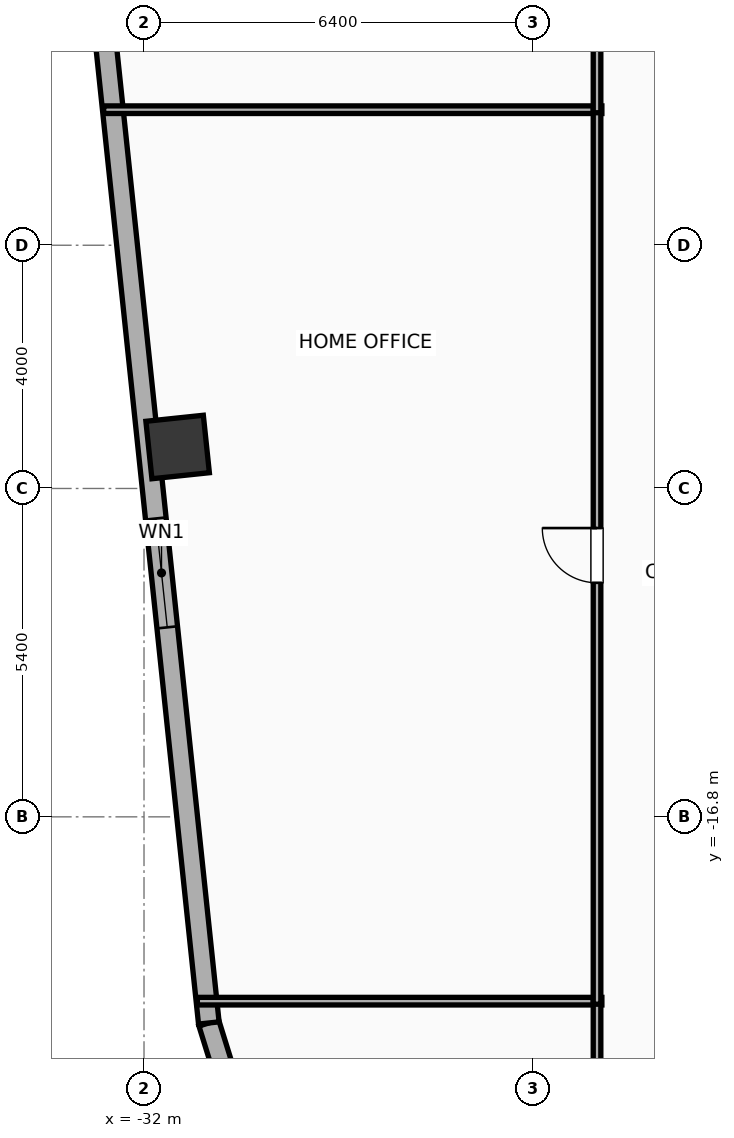
"""IFC4 building model, lengths in metres.
Left out: names, types, materials, properties, quantities, classifications, styles, units other than length and angle.
Written with IfcOpenShell. Run it as: python <this file> out.ifc"""

import sys

from ifc_helpers import new_model, si_unit, direction, frame, frame_2d, origin, origin_2d, place, context, subcontext, project, spatial, rectangle, hollow_rectangle, extrude, element, fill, save


model = new_model("IFC4")
c1 = context("Model", 3, precision=1e-05, world=origin(), true_north=direction((0.0, 1.0)))
c2 = subcontext(c1, "Body", "Model", "MODEL_VIEW")
j1 = project(units=[si_unit("LENGTHUNIT", "METRE"), si_unit("PLANEANGLEUNIT", "RADIAN")], contexts=[c1])
p1 = place(None, origin())
s1 = spatial("IfcSite", under=j1, at=p1, CompositionType="ELEMENT")
p2 = place(p1, origin())
s2 = spatial("IfcBuilding", under=s1, at=p2, CompositionType="ELEMENT")
p3 = place(p2, frame((0.0, 0.0, 159.9)))
s3 = spatial("IfcBuildingStorey", under=s2, at=p3, CompositionType="ELEMENT", Elevation=159.9)
p4 = place(p3, frame((-31.447, -10.718, 0.0), z_axis=(0.0, 0.0, 1.0), x_axis=(0.994521895368, 0.104528463268, 0.0)))
e1 = element("IfcColumn", 1, at=p4, inside=s3, PredefinedType="COLUMN", context=c2, shape_type="SweptSolid", body=[
    extrude(hollow_rectangle(XDim=0.95, YDim=0.95, WallThickness=0.032, at=origin_2d()), origin(), (0.0, 0.0, 1.0), 3.9),
])
p5 = place(p3, frame((24.756, -18.003, 0.0), z_axis=(0.0, 0.0, 1.0), x_axis=(-0.99452160744, -0.104531202687, 0.0)))
e2 = element("IfcWall", 2, at=p5, inside=s3, PredefinedType="ELEMENTEDWALL", context=c2, shape_type="SweptSolid", body=[
    extrude(rectangle(XDim=51.967, YDim=0.34, at=frame_2d((25.983, 0.0))), origin(), (0.0, 0.0, 1.0), 3.65),
])
p6 = place(p5, frame((25.633, 0.0, 0.75)))
e3 = element("IfcOpeningElement", 3, at=p6, cuts=e2, PredefinedType="OPENING", context=c2, shape_type="SweptSolid", body=[
    extrude(rectangle(XDim=2.4, YDim=2.1, at=frame_2d((1.2, 1.05))), frame((0.0, 0.18, 0.0), z_axis=(0.0, -1.0, 0.0), x_axis=(1.0, 0.0, 0.0)), (0.0, 0.0, 1.0), 0.36),
])
p7 = place(p5, frame((42.369, 0.0, 0.75)))
e4 = element("IfcOpeningElement", 4, at=p7, cuts=e2, PredefinedType="OPENING", context=c2, shape_type="SweptSolid", body=[
    extrude(rectangle(XDim=1.2, YDim=2.05, at=frame_2d((0.6, 1.025))), frame((0.0, 0.18, 0.0), z_axis=(0.0, -1.0, 0.0), x_axis=(1.0, 0.0, 0.0)), (0.0, 0.0, 1.0), 0.36),
])
p8 = place(p5, frame((34.085, 0.0, 0.75)))
e5 = element("IfcOpeningElement", 5, at=p8, cuts=e2, PredefinedType="OPENING", context=c2, shape_type="SweptSolid", body=[
    extrude(rectangle(XDim=1.2, YDim=2.05, at=frame_2d((0.6, 1.025))), frame((0.0, 0.18, 0.0), z_axis=(0.0, -1.0, 0.0), x_axis=(1.0, 0.0, 0.0)), (0.0, 0.0, 1.0), 0.36),
])
p9 = place(p5, frame((36.993, 0.0, 0.75)))
e6 = element("IfcOpeningElement", 6, at=p9, cuts=e2, PredefinedType="OPENING", context=c2, shape_type="SweptSolid", body=[
    extrude(rectangle(XDim=1.2, YDim=2.05, at=frame_2d((0.6, 1.025))), frame((0.0, 0.18, 0.0), z_axis=(0.0, -1.0, 0.0), x_axis=(1.0, 0.0, 0.0)), (0.0, 0.0, 1.0), 0.36),
])
p10 = place(p5, frame((14.397, 0.0, 0.75)))
e7 = element("IfcOpeningElement", 7, at=p10, cuts=e2, PredefinedType="OPENING", context=c2, shape_type="SweptSolid", body=[
    extrude(rectangle(XDim=1.2, YDim=2.05, at=frame_2d((0.6, 1.025))), frame((0.0, 0.18, 0.0), z_axis=(0.0, -1.0, 0.0), x_axis=(1.0, 0.0, 0.0)), (0.0, 0.0, 1.0), 0.36),
])
p11 = place(p5, frame((11.489, 0.0, 0.75)))
e8 = element("IfcOpeningElement", 8, at=p11, cuts=e2, PredefinedType="OPENING", context=c2, shape_type="SweptSolid", body=[
    extrude(rectangle(XDim=1.2, YDim=2.05, at=frame_2d((0.6, 1.025))), frame((0.0, 0.18, 0.0), z_axis=(0.0, -1.0, 0.0), x_axis=(1.0, 0.0, 0.0)), (0.0, 0.0, 1.0), 0.36),
])
p12 = place(p5, frame((8.521, 0.0, 0.75)))
e9 = element("IfcOpeningElement", 9, at=p12, cuts=e2, PredefinedType="OPENING", context=c2, shape_type="SweptSolid", body=[
    extrude(rectangle(XDim=1.2, YDim=2.05, at=frame_2d((0.6, 1.025))), frame((0.0, 0.18, 0.0), z_axis=(0.0, -1.0, 0.0), x_axis=(1.0, 0.0, 0.0)), (0.0, 0.0, 1.0), 0.36),
])
p13 = place(p5, frame((5.582, 0.0, 0.75)))
e10 = element("IfcOpeningElement", 10, at=p13, cuts=e2, PredefinedType="OPENING", context=c2, shape_type="SweptSolid", body=[
    extrude(rectangle(XDim=1.2, YDim=2.05, at=frame_2d((0.6, 1.025))), frame((0.0, 0.18, 0.0), z_axis=(0.0, -1.0, 0.0), x_axis=(1.0, 0.0, 0.0)), (0.0, 0.0, 1.0), 0.36),
])
p14 = place(p5, frame((29.313, 0.0, 0.75)))
e11 = element("IfcOpeningElement", 11, at=p14, cuts=e2, PredefinedType="OPENING", context=c2, shape_type="SweptSolid", body=[
    extrude(rectangle(XDim=1.2, YDim=2.05, at=frame_2d((0.6, 1.025))), frame((0.0, 0.18, 0.0), z_axis=(0.0, -1.0, 0.0), x_axis=(1.0, 0.0, 0.0)), (0.0, 0.0, 1.0), 0.36),
])
p15 = place(p5, frame((22.248, 0.0, 0.75)))
e12 = element("IfcOpeningElement", 12, at=p15, cuts=e2, PredefinedType="OPENING", context=c2, shape_type="SweptSolid", body=[
    extrude(rectangle(XDim=1.2, YDim=2.05, at=frame_2d((0.6, 1.025))), frame((0.0, 0.18, 0.0), z_axis=(0.0, -1.0, 0.0), x_axis=(1.0, 0.0, 0.0)), (0.0, 0.0, 1.0), 0.36),
])
p16 = place(p5, frame((18.186, 0.0, 0.75)))
e13 = element("IfcOpeningElement", 13, at=p16, cuts=e2, PredefinedType="OPENING", context=c2, shape_type="SweptSolid", body=[
    extrude(rectangle(XDim=1.2, YDim=2.05, at=frame_2d((0.6, 1.025))), frame((0.0, 0.18, 0.0), z_axis=(0.0, -1.0, 0.0), x_axis=(1.0, 0.0, 0.0)), (0.0, 0.0, 1.0), 0.36),
])
p17 = place(p5, frame((47.879, 0.0, 0.75)))
e14 = element("IfcOpeningElement", 14, at=p17, cuts=e2, PredefinedType="OPENING", context=c2, shape_type="SweptSolid", body=[
    extrude(rectangle(XDim=1.2, YDim=2.05, at=frame_2d((0.6, 1.025))), frame((0.0, 0.18, 0.0), z_axis=(0.0, -1.0, 0.0), x_axis=(1.0, 0.0, 0.0)), (0.0, 0.0, 1.0), 0.36),
])
p18 = place(p5, frame((49.844, 0.0, 0.75)))
e15 = element("IfcOpeningElement", 15, at=p18, cuts=e2, PredefinedType="OPENING", context=c2, shape_type="SweptSolid", body=[
    extrude(rectangle(XDim=1.2, YDim=2.05, at=frame_2d((0.6, 1.025))), frame((0.0, 0.18, 0.0), z_axis=(0.0, -1.0, 0.0), x_axis=(1.0, 0.0, 0.0)), (0.0, 0.0, 1.0), 0.36),
])
p19 = place(p3, frame((-30.51, -21.557, 0.0), z_axis=(0.0, 0.0, 1.0), x_axis=(-0.296624409546, 0.9549942197, 0.0)))
e16 = element("IfcWall", 16, at=p19, inside=s3, PredefinedType="ELEMENTEDWALL", context=c2, shape_type="SweptSolid", body=[
    extrude(rectangle(XDim=1.432, YDim=0.34, at=frame_2d((0.716, 0.0))), origin(), (0.0, 0.0, 1.0), 3.65),
])
p20 = place(p3, frame((-30.934, -20.19, 0.0), z_axis=(0.0, 0.0, 1.0), x_axis=(-0.10452691388, 0.994522058214, 0.0)))
e17 = element("IfcWall", 17, at=p20, inside=s3, PredefinedType="ELEMENTEDWALL", context=c2, shape_type="SweptSolid", body=[
    extrude(rectangle(XDim=33.167, YDim=0.34, at=frame_2d((16.583, 0.0))), origin(), (0.0, 0.0, 1.0), 3.65),
])
p21 = place(p20, frame((6.542, 0.0, 0.75)))
e18 = element("IfcOpeningElement", 18, at=p21, cuts=e17, PredefinedType="OPENING", context=c2, shape_type="SweptSolid", body=[
    extrude(rectangle(XDim=1.8, YDim=2.1, at=frame_2d((0.9, 1.05))), frame((0.0, 0.18, 0.0), z_axis=(0.0, -1.0, 0.0), x_axis=(1.0, 0.0, 0.0)), (0.0, 0.0, 1.0), 0.36),
])
p22 = place(p20, frame((24.825, 0.0, 0.75)))
e19 = element("IfcOpeningElement", 19, at=p22, cuts=e17, PredefinedType="OPENING", context=c2, shape_type="SweptSolid", body=[
    extrude(rectangle(XDim=1.8, YDim=2.1, at=frame_2d((0.9, 1.05))), frame((0.0, 0.18, 0.0), z_axis=(0.0, -1.0, 0.0), x_axis=(1.0, 0.0, 0.0)), (0.0, 0.0, 1.0), 0.36),
])
p23 = place(p20, frame((16.344, 0.0, 0.75)))
e20 = element("IfcOpeningElement", 20, at=p23, cuts=e17, PredefinedType="OPENING", context=c2, shape_type="SweptSolid", body=[
    extrude(rectangle(XDim=1.2, YDim=2.05, at=frame_2d((0.6, 1.025))), frame((0.0, 0.18, 0.0), z_axis=(0.0, -1.0, 0.0), x_axis=(1.0, 0.0, 0.0)), (0.0, 0.0, 1.0), 0.36),
])
p24 = place(p20, frame((19.811, 0.0, 0.75)))
e21 = element("IfcOpeningElement", 21, at=p24, cuts=e17, PredefinedType="OPENING", context=c2, shape_type="SweptSolid", body=[
    extrude(rectangle(XDim=1.2, YDim=2.05, at=frame_2d((0.6, 1.025))), frame((0.0, 0.18, 0.0), z_axis=(0.0, -1.0, 0.0), x_axis=(1.0, 0.0, 0.0)), (0.0, 0.0, 1.0), 0.36),
])
p25 = place(p3, frame((-31.123, -19.831, 0.0), z_axis=(0.0, 0.0, 1.0), x_axis=(1.0, 0.0, 0.0)))
e22 = element("IfcWall", 22, at=p25, inside=s3, PredefinedType="PARTITIONING", context=c2, shape_type="SweptSolid", body=[
    extrude(rectangle(XDim=6.653, YDim=0.125, at=frame_2d((3.326, 0.0))), origin(), (0.0, 0.0, 1.0), 3.65),
])
p26 = place(p3, frame((-32.664, -5.171, 0.0), z_axis=(0.0, 0.0, 1.0), x_axis=(1.0, 0.0, 0.0)))
e23 = element("IfcWall", 23, at=p26, inside=s3, PredefinedType="PARTITIONING", context=c2, shape_type="SweptSolid", body=[
    extrude(rectangle(XDim=8.194, YDim=0.125, at=frame_2d((4.097, 0.0))), origin(), (0.0, 0.0, 1.0), 3.65),
])
p27 = place(p3, frame((-24.55, -23.336, 0.0), z_axis=(0.0, 0.0, 1.0), x_axis=(0.0, 1.0, 0.0)))
e24 = element("IfcWall", 24, at=p27, inside=s3, PredefinedType="PARTITIONING", context=c2, shape_type="SweptSolid", body=[
    extrude(rectangle(XDim=3.555, YDim=0.125, at=frame_2d((1.778, 0.0))), origin(), (0.0, 0.0, 1.0), 3.65),
])
p28 = place(p27, frame((1.328, 0.0, 0.0)))
e25 = element("IfcOpeningElement", 25, at=p28, cuts=e24, PredefinedType="OPENING", context=c2, shape_type="SweptSolid", body=[
    extrude(rectangle(XDim=0.9, YDim=2.05, at=frame_2d((0.45, 1.025))), frame((0.0, 0.073, 0.0), z_axis=(0.0, -1.0, 0.0), x_axis=(1.0, 0.0, 0.0)), (0.0, 0.0, 1.0), 0.145),
])
p29 = place(p3, frame((-24.55, -19.881, 0.0), z_axis=(0.0, 0.0, 1.0), x_axis=(0.0, 1.0, 0.0)))
e26 = element("IfcWall", 26, at=p29, inside=s3, PredefinedType="PARTITIONING", context=c2, shape_type="SweptSolid", body=[
    extrude(rectangle(XDim=14.76, YDim=0.125, at=frame_2d((7.38, 0.0))), origin(), (0.0, 0.0, 1.0), 3.65),
])
p30 = place(p29, frame((6.93, 0.0, 0.0)))
e27 = element("IfcOpeningElement", 27, at=p30, cuts=e26, PredefinedType="OPENING", context=c2, shape_type="SweptSolid", body=[
    extrude(rectangle(XDim=0.9, YDim=2.05, at=frame_2d((0.45, 1.025))), frame((0.0, 0.073, 0.0), z_axis=(0.0, -1.0, 0.0), x_axis=(1.0, 0.0, 0.0)), (0.0, 0.0, 1.0), 0.145),
])
p31 = place(p3, frame((-24.55, -5.221, 0.0), z_axis=(0.0, 0.0, 1.0), x_axis=(0.0, 1.0, 0.0)))
e28 = element("IfcWall", 28, at=p31, inside=s3, PredefinedType="PARTITIONING", context=c2, shape_type="SweptSolid", body=[
    extrude(rectangle(XDim=3.783, YDim=0.125, at=frame_2d((1.892, 0.0))), origin(), (0.0, 0.0, 1.0), 3.65),
])
p32 = place(p31, frame((1.541, 0.0, 0.0)))
e29 = element("IfcOpeningElement", 29, at=p32, cuts=e28, PredefinedType="OPENING", context=c2, shape_type="SweptSolid", body=[
    extrude(rectangle(XDim=0.9, YDim=2.05, at=frame_2d((0.45, 1.025))), frame((0.0, 0.073, 0.0), z_axis=(0.0, -1.0, 0.0), x_axis=(1.0, 0.0, 0.0)), (0.0, 0.0, 1.0), 0.145),
])
p33 = place(p21, origin())
e30 = element("IfcWindow", 30, at=p33, inside=s3, PartitioningType="SINGLE_PANEL", PredefinedType="WINDOW", context=c2, shape_type="SweptSolid", body=[
    extrude(rectangle(XDim=1.8, YDim=2.1, at=frame_2d((0.9, 1.05))), frame((0.0, 0.03, 0.0), z_axis=(0.0, -1.0, 0.0), x_axis=(1.0, 0.0, 0.0)), (0.0, 0.0, 1.0), 0.06),
])
fill(e18, e30)
p34 = place(p30, origin())
e31 = element("IfcDoor", 31, at=p34, inside=s3, OperationType="SINGLE_SWING_RIGHT", PredefinedType="DOOR", context=c2, shape_type="SweptSolid", body=[
    extrude(rectangle(XDim=0.9, YDim=2.05, at=frame_2d((0.45, 1.025))), frame((0.0, 0.025, 0.0), z_axis=(0.0, -1.0, 0.0), x_axis=(1.0, 0.0, 0.0)), (0.0, 0.0, 1.0), 0.05),
])
fill(e27, e31)
save(model, sys.argv[1])
